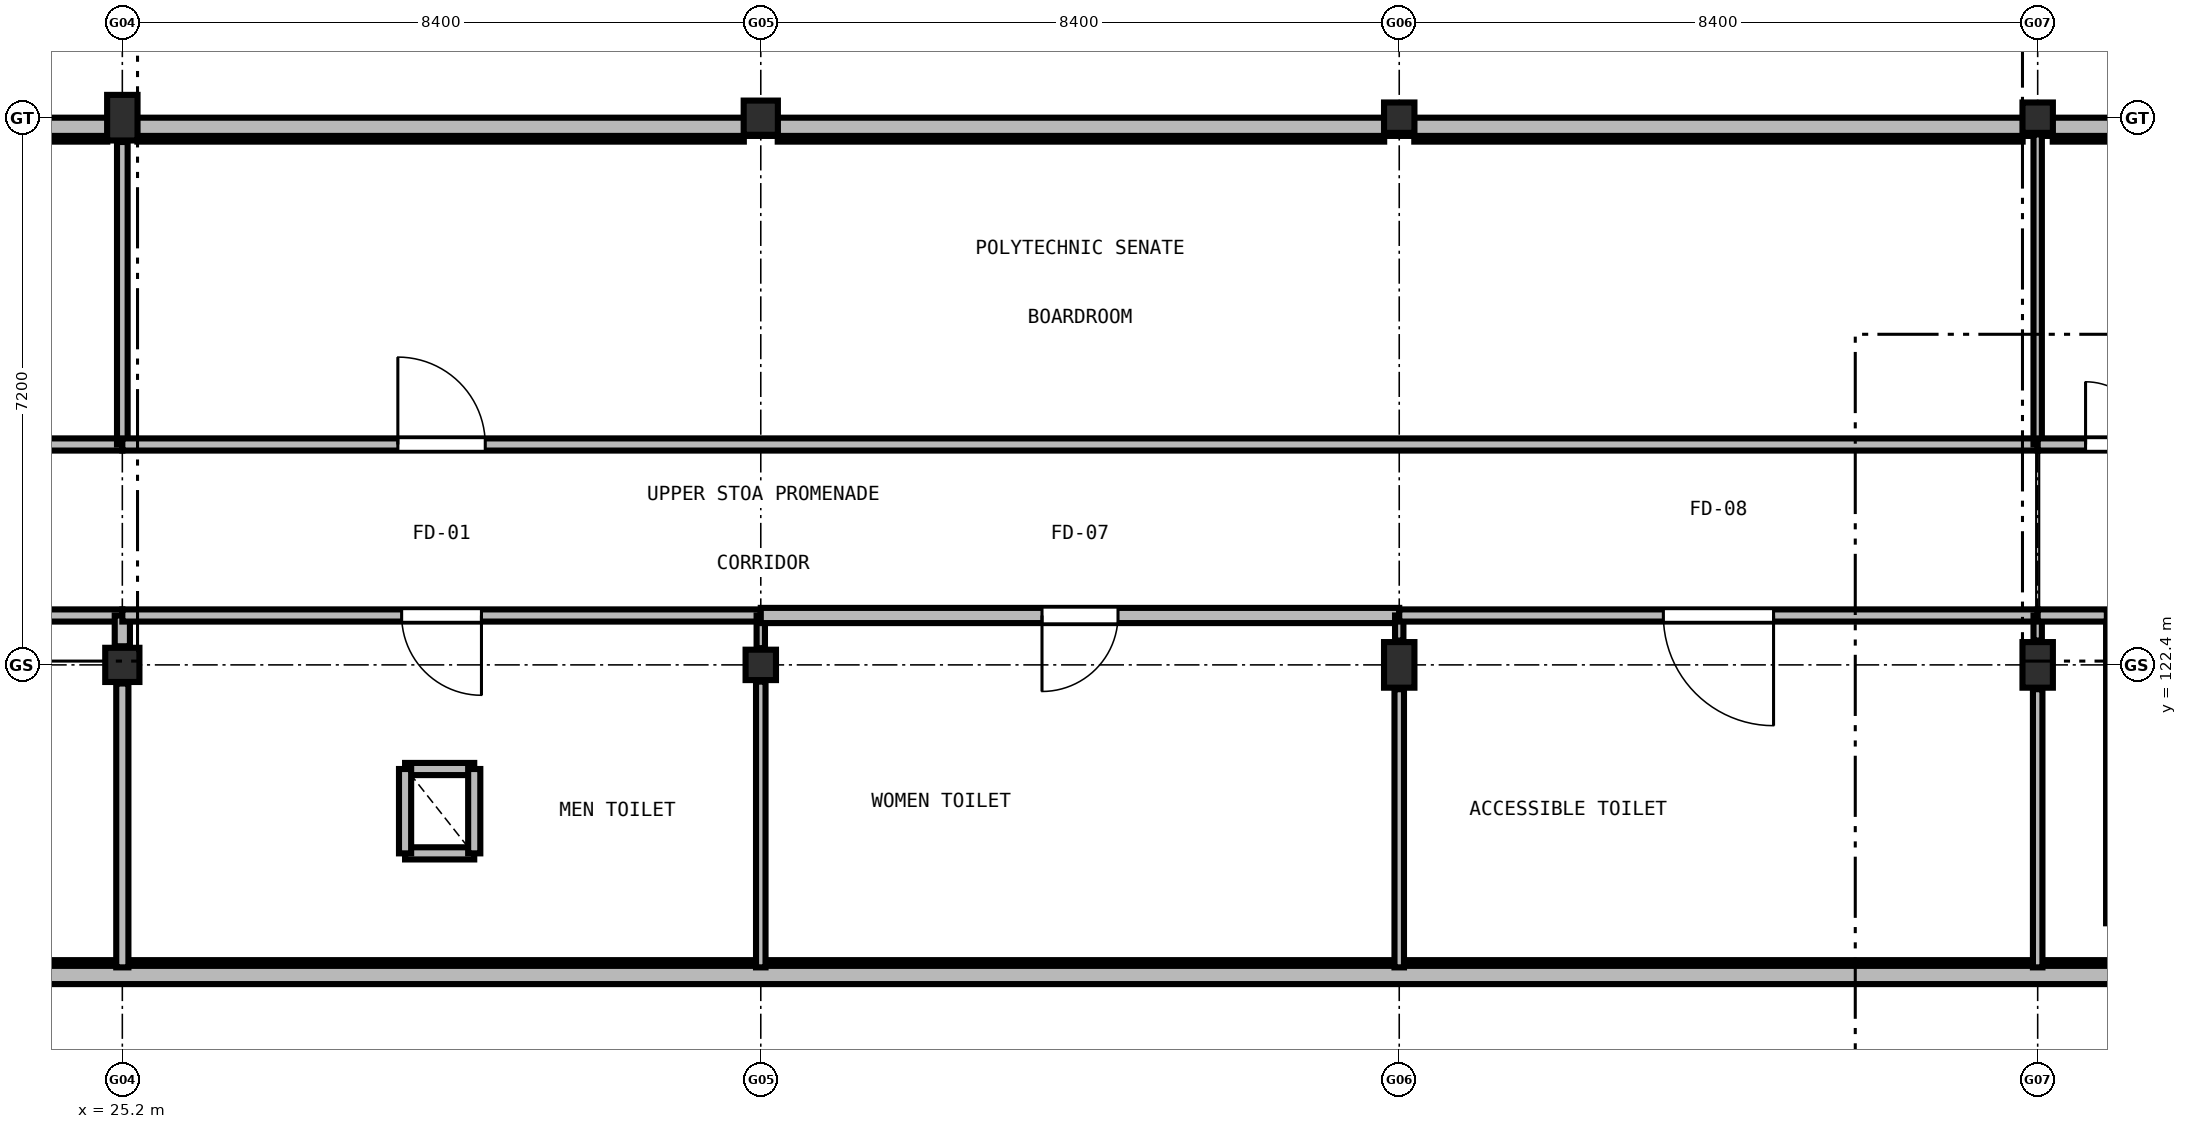
"""IFC4 building model, lengths in metres.
Left out: names, types, materials, properties, quantities, classifications, styles, units other than length and angle.
Written with IfcOpenShell. Run it as: python <this file> out.ifc"""

import sys

from ifc_helpers import new_model, si_unit, direction, frame, frame_2d, origin, origin_2d, place, context, subcontext, project, spatial, rectangle, extrude, element, fill, save


model = new_model("IFC4")
c1 = context("Model", 3, precision=1e-05, world=origin(), true_north=direction((0.0, 1.0)))
c2 = subcontext(c1, "Body", "Model", "MODEL_VIEW")
j1 = project(units=[si_unit("LENGTHUNIT", "METRE"), si_unit("PLANEANGLEUNIT", "RADIAN")], contexts=[c1])
p1 = place(None, origin())
s1 = spatial("IfcSite", under=j1, at=p1, CompositionType="ELEMENT")
p2 = place(p1, origin())
s2 = spatial("IfcBuilding", under=s1, at=p2, CompositionType="ELEMENT")
p3 = place(p2, frame((0.0, 0.0, 26.1)))
s3 = spatial("IfcBuildingStorey", under=s2, at=p3, CompositionType="ELEMENT", Elevation=26.1)
p4 = place(p3, frame((25.2, 122.4, 0.0), z_axis=(0.0, 0.0, 1.0), x_axis=(1.0, 0.0, 0.0)))
e1 = element("IfcColumn", 1, at=p4, inside=s3, PredefinedType="COLUMN", context=c2, shape_type="SweptSolid", body=[
    extrude(rectangle(XDim=0.45, YDim=0.45, at=origin_2d()), origin(), (0.0, 0.0, 1.0), 4.2),
])
p5 = place(p3, frame((25.2, 129.6, 0.0), z_axis=(0.0, 0.0, 1.0), x_axis=(1.0, 0.0, 0.0)))
e2 = element("IfcColumn", 2, at=p5, inside=s3, PredefinedType="COLUMN", context=c2, shape_type="SweptSolid", body=[
    extrude(rectangle(XDim=0.4, YDim=0.6, at=origin_2d()), origin(), (0.0, 0.0, 1.0), 4.2),
])
p6 = place(p3, frame((33.6, 122.4, 0.0), z_axis=(0.0, 0.0, 1.0), x_axis=(1.0, 0.0, 0.0)))
e3 = element("IfcColumn", 3, at=p6, inside=s3, PredefinedType="COLUMN", context=c2, shape_type="SweptSolid", body=[
    extrude(rectangle(XDim=0.4, YDim=0.4, at=origin_2d()), origin(), (0.0, 0.0, 1.0), 4.2),
])
p7 = place(p3, frame((33.6, 129.6, 0.0), z_axis=(0.0, 0.0, 1.0), x_axis=(1.0, 0.0, 0.0)))
e4 = element("IfcColumn", 4, at=p7, inside=s3, PredefinedType="COLUMN", context=c2, shape_type="SweptSolid", body=[
    extrude(rectangle(XDim=0.45, YDim=0.45, at=origin_2d()), origin(), (0.0, 0.0, 1.0), 4.2),
])
p8 = place(p3, frame((42.0, 122.4, 0.0), z_axis=(0.0, 0.0, 1.0), x_axis=(1.0, 0.0, 0.0)))
e5 = element("IfcColumn", 5, at=p8, inside=s3, PredefinedType="COLUMN", context=c2, shape_type="SweptSolid", body=[
    extrude(rectangle(XDim=0.4, YDim=0.6, at=origin_2d()), origin(), (0.0, 0.0, 1.0), 4.2),
])
p9 = place(p3, frame((42.0, 129.6, 0.0), z_axis=(0.0, 0.0, 1.0), x_axis=(1.0, 0.0, 0.0)))
e6 = element("IfcColumn", 6, at=p9, inside=s3, PredefinedType="COLUMN", context=c2, shape_type="SweptSolid", body=[
    extrude(rectangle(XDim=0.4, YDim=0.4, at=origin_2d()), origin(), (0.0, 0.0, 1.0), 4.2),
])
p10 = place(p3, frame((50.4, 122.4, 0.0), z_axis=(0.0, 0.0, 1.0), x_axis=(1.0, 0.0, 0.0)))
e7 = element("IfcColumn", 7, at=p10, inside=s3, PredefinedType="COLUMN", context=c2, shape_type="SweptSolid", body=[
    extrude(rectangle(XDim=0.4, YDim=0.6, at=origin_2d()), origin(), (0.0, 0.0, 1.0), 4.2),
])
p11 = place(p3, frame((50.4, 129.6, 0.0), z_axis=(0.0, 0.0, 1.0), x_axis=(1.0, 0.0, 0.0)))
e8 = element("IfcColumn", 8, at=p11, inside=s3, PredefinedType="COLUMN", context=c2, shape_type="SweptSolid", body=[
    extrude(rectangle(XDim=0.4, YDim=0.4, at=origin_2d()), origin(), (0.0, 0.0, 1.0), 4.2),
])
p12 = place(p3, frame((75.6, 118.37, 0.0), z_axis=(0.0, 0.0, 1.0), x_axis=(-1.0, 0.0, 0.0)))
e9 = element("IfcWall", 9, at=p12, inside=s3, PredefinedType="SOLIDWALL", context=c2, shape_type="SweptSolid", body=[
    extrude(rectangle(XDim=75.6, YDim=0.29, at=frame_2d((37.8, 0.0))), origin(), (0.0, 0.0, 1.0), 3.86),
])
p13 = place(p3, frame((16.998, 129.43, 0.0), z_axis=(0.0, 0.0, 1.0), x_axis=(1.0, 0.0, 0.0)))
e10 = element("IfcWall", 10, at=p13, inside=s3, PredefinedType="SOLIDWALL", context=c2, shape_type="SweptSolid", body=[
    extrude(rectangle(XDim=8.004, YDim=0.29, at=frame_2d((4.002, 0.0))), origin(), (0.0, 0.0, 1.0), 3.59),
])
for number, where, z_axis, x_axis in (
    (11, (25.398, 129.43, 0.0), (0.0, 0.0, 1.0), (1.0, 0.0, 0.0)),
    (12, (33.823, 129.43, 0.0), (0.0, 0.0, 1.0), (1.0, 0.0, 0.0)),
):
    element("IfcWall", number, at=place(p3, frame(where, z_axis=z_axis, x_axis=x_axis)), inside=s3, PredefinedType="SOLIDWALL", context=c2, shape_type="SweptSolid", body=[
        extrude(rectangle(XDim=7.979, YDim=0.29, at=frame_2d((3.99, 0.0))), origin(), (0.0, 0.0, 1.0), 3.57),
    ])
p14 = place(p3, frame((42.198, 129.43, 0.0), z_axis=(0.0, 0.0, 1.0), x_axis=(1.0, 0.0, 0.0)))
e13 = element("IfcWall", 13, at=p14, inside=s3, PredefinedType="SOLIDWALL", context=c2, shape_type="SweptSolid", body=[
    extrude(rectangle(XDim=8.004, YDim=0.29, at=frame_2d((4.002, 0.0))), origin(), (0.0, 0.0, 1.0), 3.57),
])
p15 = place(p3, frame((50.598, 129.43, 0.0), z_axis=(0.0, 0.0, 1.0), x_axis=(1.0, 0.0, 0.0)))
e14 = element("IfcWall", 14, at=p15, inside=s3, PredefinedType="SOLIDWALL", context=c2, shape_type="SweptSolid", body=[
    extrude(rectangle(XDim=7.979, YDim=0.29, at=frame_2d((3.99, 0.0))), origin(), (0.0, 0.0, 1.0), 3.59),
])
for number, where, z_axis, x_axis in (
    (15, (0.12, 129.48, 4.2), (0.0, 0.0, 1.0), (1.0, 0.0, 0.0)),
    (16, (75.48, 118.32, 4.2), (0.0, 0.0, 1.0), (-1.0, 0.0, 0.0)),
):
    element("IfcWall", number, at=place(p3, frame(where, z_axis=z_axis, x_axis=x_axis)), inside=s3, PredefinedType="PARAPET", context=c2, shape_type="SweptSolid", body=[
        extrude(rectangle(XDim=75.36, YDim=0.24, at=frame_2d((37.68, 0.0))), origin(), (0.0, 0.0, 1.0), 0.95),
    ])
p16 = place(p3, frame((51.45, 119.0, 0.0), z_axis=(0.0, 0.0, 1.0), x_axis=(0.0, 1.0, 0.0)))
e17 = element("IfcWall", 17, at=p16, inside=s3, PredefinedType="SHEAR", context=c2, shape_type="SweptSolid", body=[
    extrude(rectangle(XDim=4.1, YDim=0.3, at=frame_2d((2.05, 0.0))), origin(), (0.0, 0.0, 1.0), 3.96),
])
for number, where, z_axis, x_axis in (
    (18, (28.92, 119.92, 0.0), (0.0, 0.0, 1.0), (1.0, 0.0, 0.0)),
    (19, (29.83, 121.03, 0.0), (0.0, 0.0, 1.0), (-1.0, 0.0, 0.0)),
):
    element("IfcWall", number, at=place(p3, frame(where, z_axis=z_axis, x_axis=x_axis)), inside=s3, PredefinedType="PARTITIONING", context=c2, shape_type="SweptSolid", body=[
        extrude(rectangle(XDim=0.91, YDim=0.16, at=frame_2d((0.455, 0.0))), origin(), (0.0, 0.0, 1.0), 3.65),
    ])
for number, where, z_axis, x_axis in (
    (20, (28.92, 121.03, 0.0), (0.0, 0.0, 1.0), (0.0, -1.0, 0.0)),
    (21, (29.83, 119.92, 0.0), (0.0, 0.0, 1.0), (0.0, 1.0, 0.0)),
):
    element("IfcWall", number, at=place(p3, frame(where, z_axis=z_axis, x_axis=x_axis)), inside=s3, PredefinedType="PARTITIONING", context=c2, shape_type="SweptSolid", body=[
        extrude(rectangle(XDim=1.11, YDim=0.16, at=frame_2d((0.555, 0.0))), origin(), (0.0, 0.0, 1.0), 3.65),
    ])
p17 = place(p3, frame((22.47, 125.3, 0.0), z_axis=(0.0, 0.0, 1.0), x_axis=(1.0, 0.0, 0.0)))
e22 = element("IfcWall", 22, at=p17, inside=s3, PredefinedType="PARTITIONING", context=c2, shape_type="SweptSolid", body=[
    extrude(rectangle(XDim=2.73, YDim=0.16, at=frame_2d((1.365, 0.0))), origin(), (0.0, 0.0, 1.0), 3.495),
])
p18 = place(p3, frame((25.2, 125.3, 0.0), z_axis=(0.0, 0.0, 1.0), x_axis=(0.0, 1.0, 0.0)))
e23 = element("IfcWall", 23, at=p18, inside=s3, PredefinedType="PARTITIONING", context=c2, shape_type="SweptSolid", body=[
    extrude(rectangle(XDim=3.98, YDim=0.14, at=frame_2d((1.99, 0.0))), origin(), (0.0, 0.0, 1.0), 3.495),
])
p19 = place(p3, frame((25.2, 125.3, 0.0), z_axis=(0.0, 0.0, 1.0), x_axis=(1.0, 0.0, 0.0)))
e24 = element("IfcWall", 24, at=p19, inside=s3, PredefinedType="PARTITIONING", context=c2, shape_type="SweptSolid", body=[
    extrude(rectangle(XDim=25.2, YDim=0.16, at=frame_2d((12.6, 0.0))), origin(), (0.0, 0.0, 1.0), 3.495),
])
p20 = place(p19, frame((3.625, 0.0, 0.0)))
e25 = element("IfcOpeningElement", 25, at=p20, cuts=e24, PredefinedType="OPENING", context=c2, shape_type="SweptSolid", body=[
    extrude(rectangle(XDim=1.15, YDim=2.15, at=frame_2d((0.575, 1.075))), frame((0.0, 0.09, 0.0), z_axis=(0.0, -1.0, 0.0), x_axis=(1.0, 0.0, 0.0)), (0.0, 0.0, 1.0), 0.18),
])
p21 = place(p3, frame((50.4, 125.3, 0.0), z_axis=(0.0, 0.0, 1.0), x_axis=(0.0, 1.0, 0.0)))
e26 = element("IfcWall", 26, at=p21, inside=s3, PredefinedType="PARTITIONING", context=c2, shape_type="SweptSolid", body=[
    extrude(rectangle(XDim=4.08, YDim=0.11, at=frame_2d((2.04, 0.0))), origin(), (0.0, 0.0, 1.0), 3.495),
])
p22 = place(p3, frame((50.4, 125.3, 0.0), z_axis=(0.0, 0.0, 1.0), x_axis=(1.0, 0.0, 0.0)))
e27 = element("IfcWall", 27, at=p22, inside=s3, PredefinedType="PARTITIONING", context=c2, shape_type="SweptSolid", body=[
    extrude(rectangle(XDim=2.73, YDim=0.16, at=frame_2d((1.365, 0.0))), origin(), (0.0, 0.0, 1.0), 3.495),
])
p23 = place(p22, frame((0.63, 0.0, 0.0)))
e28 = element("IfcOpeningElement", 28, at=p23, cuts=e27, PredefinedType="OPENING", context=c2, shape_type="SweptSolid", body=[
    extrude(rectangle(XDim=1.65, YDim=2.2, at=frame_2d((0.825, 1.1))), frame((0.0, 0.09, 0.0), z_axis=(0.0, -1.0, 0.0), x_axis=(1.0, 0.0, 0.0)), (0.0, 0.0, 1.0), 0.18),
])
p24 = place(p3, frame((25.2, 123.05, 0.0), z_axis=(0.0, 0.0, 1.0), x_axis=(-1.0, 0.0, 0.0)))
e29 = element("IfcWall", 29, at=p24, inside=s3, PredefinedType="PARTITIONING", context=c2, shape_type="SweptSolid", body=[
    extrude(rectangle(XDim=6.11, YDim=0.16, at=frame_2d((3.055, 0.0))), origin(), (0.0, 0.0, 1.0), 3.495),
])
p25 = place(p3, frame((25.2, 118.42, 0.0), z_axis=(0.0, 0.0, 1.0), x_axis=(0.0, 1.0, 0.0)))
e30 = element("IfcWall", 30, at=p25, inside=s3, PredefinedType="PARTITIONING", context=c2, shape_type="SweptSolid", body=[
    extrude(rectangle(XDim=3.735, YDim=0.16, at=frame_2d((1.868, 0.0))), origin(), (0.0, 0.0, 1.0), 3.345),
])
p26 = place(p3, frame((25.2, 122.645, 0.0), z_axis=(0.0, 0.0, 1.0), x_axis=(0.0, 1.0, 0.0)))
e31 = element("IfcWall", 31, at=p26, inside=s3, PredefinedType="SOLIDWALL", context=c2, shape_type="SweptSolid", body=[
    extrude(rectangle(XDim=0.405, YDim=0.2, at=frame_2d((0.203, 0.0))), origin(), (0.0, 0.0, 1.0), 3.345),
])
p27 = place(p3, frame((33.6, 123.05, 0.0), z_axis=(0.0, 0.0, 1.0), x_axis=(-1.0, 0.0, 0.0)))
e32 = element("IfcWall", 32, at=p27, inside=s3, PredefinedType="PARTITIONING", context=c2, shape_type="SweptSolid", body=[
    extrude(rectangle(XDim=8.4, YDim=0.16, at=frame_2d((4.2, 0.0))), origin(), (0.0, 0.0, 1.0), 3.495),
])
p28 = place(p27, frame((3.675, 0.0, 0.0)))
e33 = element("IfcOpeningElement", 33, at=p28, cuts=e32, PredefinedType="OPENING", context=c2, shape_type="SweptSolid", body=[
    extrude(rectangle(XDim=1.05, YDim=2.15, at=frame_2d((0.525, 1.075))), frame((0.0, 0.09, 0.0), z_axis=(0.0, -1.0, 0.0), x_axis=(1.0, 0.0, 0.0)), (0.0, 0.0, 1.0), 0.18),
])
p29 = place(p3, frame((33.6, 118.42, 0.0), z_axis=(0.0, 0.0, 1.0), x_axis=(0.0, 1.0, 0.0)))
e34 = element("IfcWall", 34, at=p29, inside=s3, PredefinedType="PARTITIONING", context=c2, shape_type="SweptSolid", body=[
    extrude(rectangle(XDim=3.76, YDim=0.125, at=frame_2d((1.88, 0.0))), origin(), (0.0, 0.0, 1.0), 3.345),
])
p30 = place(p3, frame((33.6, 122.62, 0.0), z_axis=(0.0, 0.0, 1.0), x_axis=(0.0, 1.0, 0.0)))
e35 = element("IfcWall", 35, at=p30, inside=s3, PredefinedType="PARTITIONING", context=c2, shape_type="SweptSolid", body=[
    extrude(rectangle(XDim=0.43, YDim=0.11, at=frame_2d((0.215, 0.0))), origin(), (0.0, 0.0, 1.0), 3.345),
])
p31 = place(p3, frame((42.0, 123.05, 0.0), z_axis=(0.0, 0.0, 1.0), x_axis=(-1.0, 0.0, 0.0)))
e36 = element("IfcWall", 36, at=p31, inside=s3, PredefinedType="SOLIDWALL", context=c2, shape_type="SweptSolid", body=[
    extrude(rectangle(XDim=8.4, YDim=0.2, at=frame_2d((4.2, 0.0))), origin(), (0.0, 0.0, 1.0), 3.495),
])
p32 = place(p31, frame((3.7, 0.0, 0.0)))
e37 = element("IfcOpeningElement", 37, at=p32, cuts=e36, PredefinedType="OPENING", context=c2, shape_type="SweptSolid", body=[
    extrude(rectangle(XDim=1.0, YDim=2.1, at=frame_2d((0.5, 1.05))), frame((0.0, 0.11, 0.0), z_axis=(0.0, -1.0, 0.0), x_axis=(1.0, 0.0, 0.0)), (0.0, 0.0, 1.0), 0.22),
])
p33 = place(p3, frame((42.0, 118.42, 0.0), z_axis=(0.0, 0.0, 1.0), x_axis=(0.0, 1.0, 0.0)))
e38 = element("IfcWall", 38, at=p33, inside=s3, PredefinedType="PARTITIONING", context=c2, shape_type="SweptSolid", body=[
    extrude(rectangle(XDim=3.66, YDim=0.125, at=frame_2d((1.83, 0.0))), origin(), (0.0, 0.0, 1.0), 3.345),
])
p34 = place(p3, frame((42.0, 122.72, 0.0), z_axis=(0.0, 0.0, 1.0), x_axis=(0.0, 1.0, 0.0)))
e39 = element("IfcWall", 39, at=p34, inside=s3, PredefinedType="PARTITIONING", context=c2, shape_type="SweptSolid", body=[
    extrude(rectangle(XDim=0.33, YDim=0.11, at=frame_2d((0.165, 0.0))), origin(), (0.0, 0.0, 1.0), 3.345),
])
p35 = place(p3, frame((50.4, 123.05, 0.0), z_axis=(0.0, 0.0, 1.0), x_axis=(-1.0, 0.0, 0.0)))
e40 = element("IfcWall", 40, at=p35, inside=s3, PredefinedType="PARTITIONING", context=c2, shape_type="SweptSolid", body=[
    extrude(rectangle(XDim=8.4, YDim=0.16, at=frame_2d((4.2, 0.0))), origin(), (0.0, 0.0, 1.0), 3.495),
])
p36 = place(p35, frame((3.475, 0.0, 0.0)))
e41 = element("IfcOpeningElement", 41, at=p36, cuts=e40, PredefinedType="OPENING", context=c2, shape_type="SweptSolid", body=[
    extrude(rectangle(XDim=1.45, YDim=2.2, at=frame_2d((0.725, 1.1))), frame((0.0, 0.09, 0.0), z_axis=(0.0, -1.0, 0.0), x_axis=(1.0, 0.0, 0.0)), (0.0, 0.0, 1.0), 0.18),
])
p37 = place(p3, frame((50.4, 118.42, 0.0), z_axis=(0.0, 0.0, 1.0), x_axis=(0.0, 1.0, 0.0)))
e42 = element("IfcWall", 42, at=p37, inside=s3, PredefinedType="PARTITIONING", context=c2, shape_type="SweptSolid", body=[
    extrude(rectangle(XDim=3.66, YDim=0.125, at=frame_2d((1.83, 0.0))), origin(), (0.0, 0.0, 1.0), 3.345),
])
p38 = place(p3, frame((50.4, 122.72, 0.0), z_axis=(0.0, 0.0, 1.0), x_axis=(0.0, 1.0, 0.0)))
e43 = element("IfcWall", 43, at=p38, inside=s3, PredefinedType="PARTITIONING", context=c2, shape_type="SweptSolid", body=[
    extrude(rectangle(XDim=0.33, YDim=0.11, at=frame_2d((0.165, 0.0))), origin(), (0.0, 0.0, 1.0), 3.345),
])
p39 = place(p3, frame((51.31, 123.05, 0.0), z_axis=(0.0, 0.0, 1.0), x_axis=(-1.0, 0.0, 0.0)))
e44 = element("IfcWall", 44, at=p39, inside=s3, PredefinedType="PARTITIONING", context=c2, shape_type="SweptSolid", body=[
    extrude(rectangle(XDim=0.91, YDim=0.16, at=frame_2d((0.455, 0.0))), origin(), (0.0, 0.0, 1.0), 3.495),
])
p40 = place(p20, origin())
e45 = element("IfcDoor", 45, at=p40, inside=s3, OperationType="SINGLE_SWING_LEFT", PredefinedType="DOOR", context=c2, shape_type="SweptSolid", body=[
    extrude(rectangle(XDim=1.15, YDim=2.15, at=frame_2d((0.575, 1.075))), frame((0.0, 0.025, 0.0), z_axis=(0.0, -1.0, 0.0), x_axis=(1.0, 0.0, 0.0)), (0.0, 0.0, 1.0), 0.05),
])
fill(e25, e45)
p41 = place(p23, origin())
e46 = element("IfcDoor", 46, at=p41, inside=s3, OperationType="DOUBLE_DOOR_SINGLE_SWING", PredefinedType="DOOR", context=c2, shape_type="SweptSolid", body=[
    extrude(rectangle(XDim=1.65, YDim=2.2, at=frame_2d((0.825, 1.1))), frame((0.0, 0.025, 0.0), z_axis=(0.0, -1.0, 0.0), x_axis=(1.0, 0.0, 0.0)), (0.0, 0.0, 1.0), 0.05),
])
fill(e28, e46)
p42 = place(p28, origin())
e47 = element("IfcDoor", 47, at=p42, inside=s3, OperationType="SINGLE_SWING_LEFT", PredefinedType="DOOR", context=c2, shape_type="SweptSolid", body=[
    extrude(rectangle(XDim=1.05, YDim=2.15, at=frame_2d((0.525, 1.075))), frame((0.0, 0.025, 0.0), z_axis=(0.0, -1.0, 0.0), x_axis=(1.0, 0.0, 0.0)), (0.0, 0.0, 1.0), 0.05),
])
fill(e33, e47)
p43 = place(p32, origin())
e48 = element("IfcDoor", 48, at=p43, inside=s3, OperationType="SINGLE_SWING_RIGHT", PredefinedType="DOOR", context=c2, shape_type="SweptSolid", body=[
    extrude(rectangle(XDim=1.0, YDim=2.1, at=frame_2d((0.5, 1.05))), frame((0.0, 0.025, 0.0), z_axis=(0.0, -1.0, 0.0), x_axis=(1.0, 0.0, 0.0)), (0.0, 0.0, 1.0), 0.05),
])
fill(e37, e48)
p44 = place(p36, origin())
e49 = element("IfcDoor", 49, at=p44, inside=s3, OperationType="SINGLE_SWING_LEFT", PredefinedType="DOOR", context=c2, shape_type="SweptSolid", body=[
    extrude(rectangle(XDim=1.45, YDim=2.2, at=frame_2d((0.725, 1.1))), frame((0.0, 0.025, 0.0), z_axis=(0.0, -1.0, 0.0), x_axis=(1.0, 0.0, 0.0)), (0.0, 0.0, 1.0), 0.05),
])
fill(e41, e49)
save(model, sys.argv[1])
